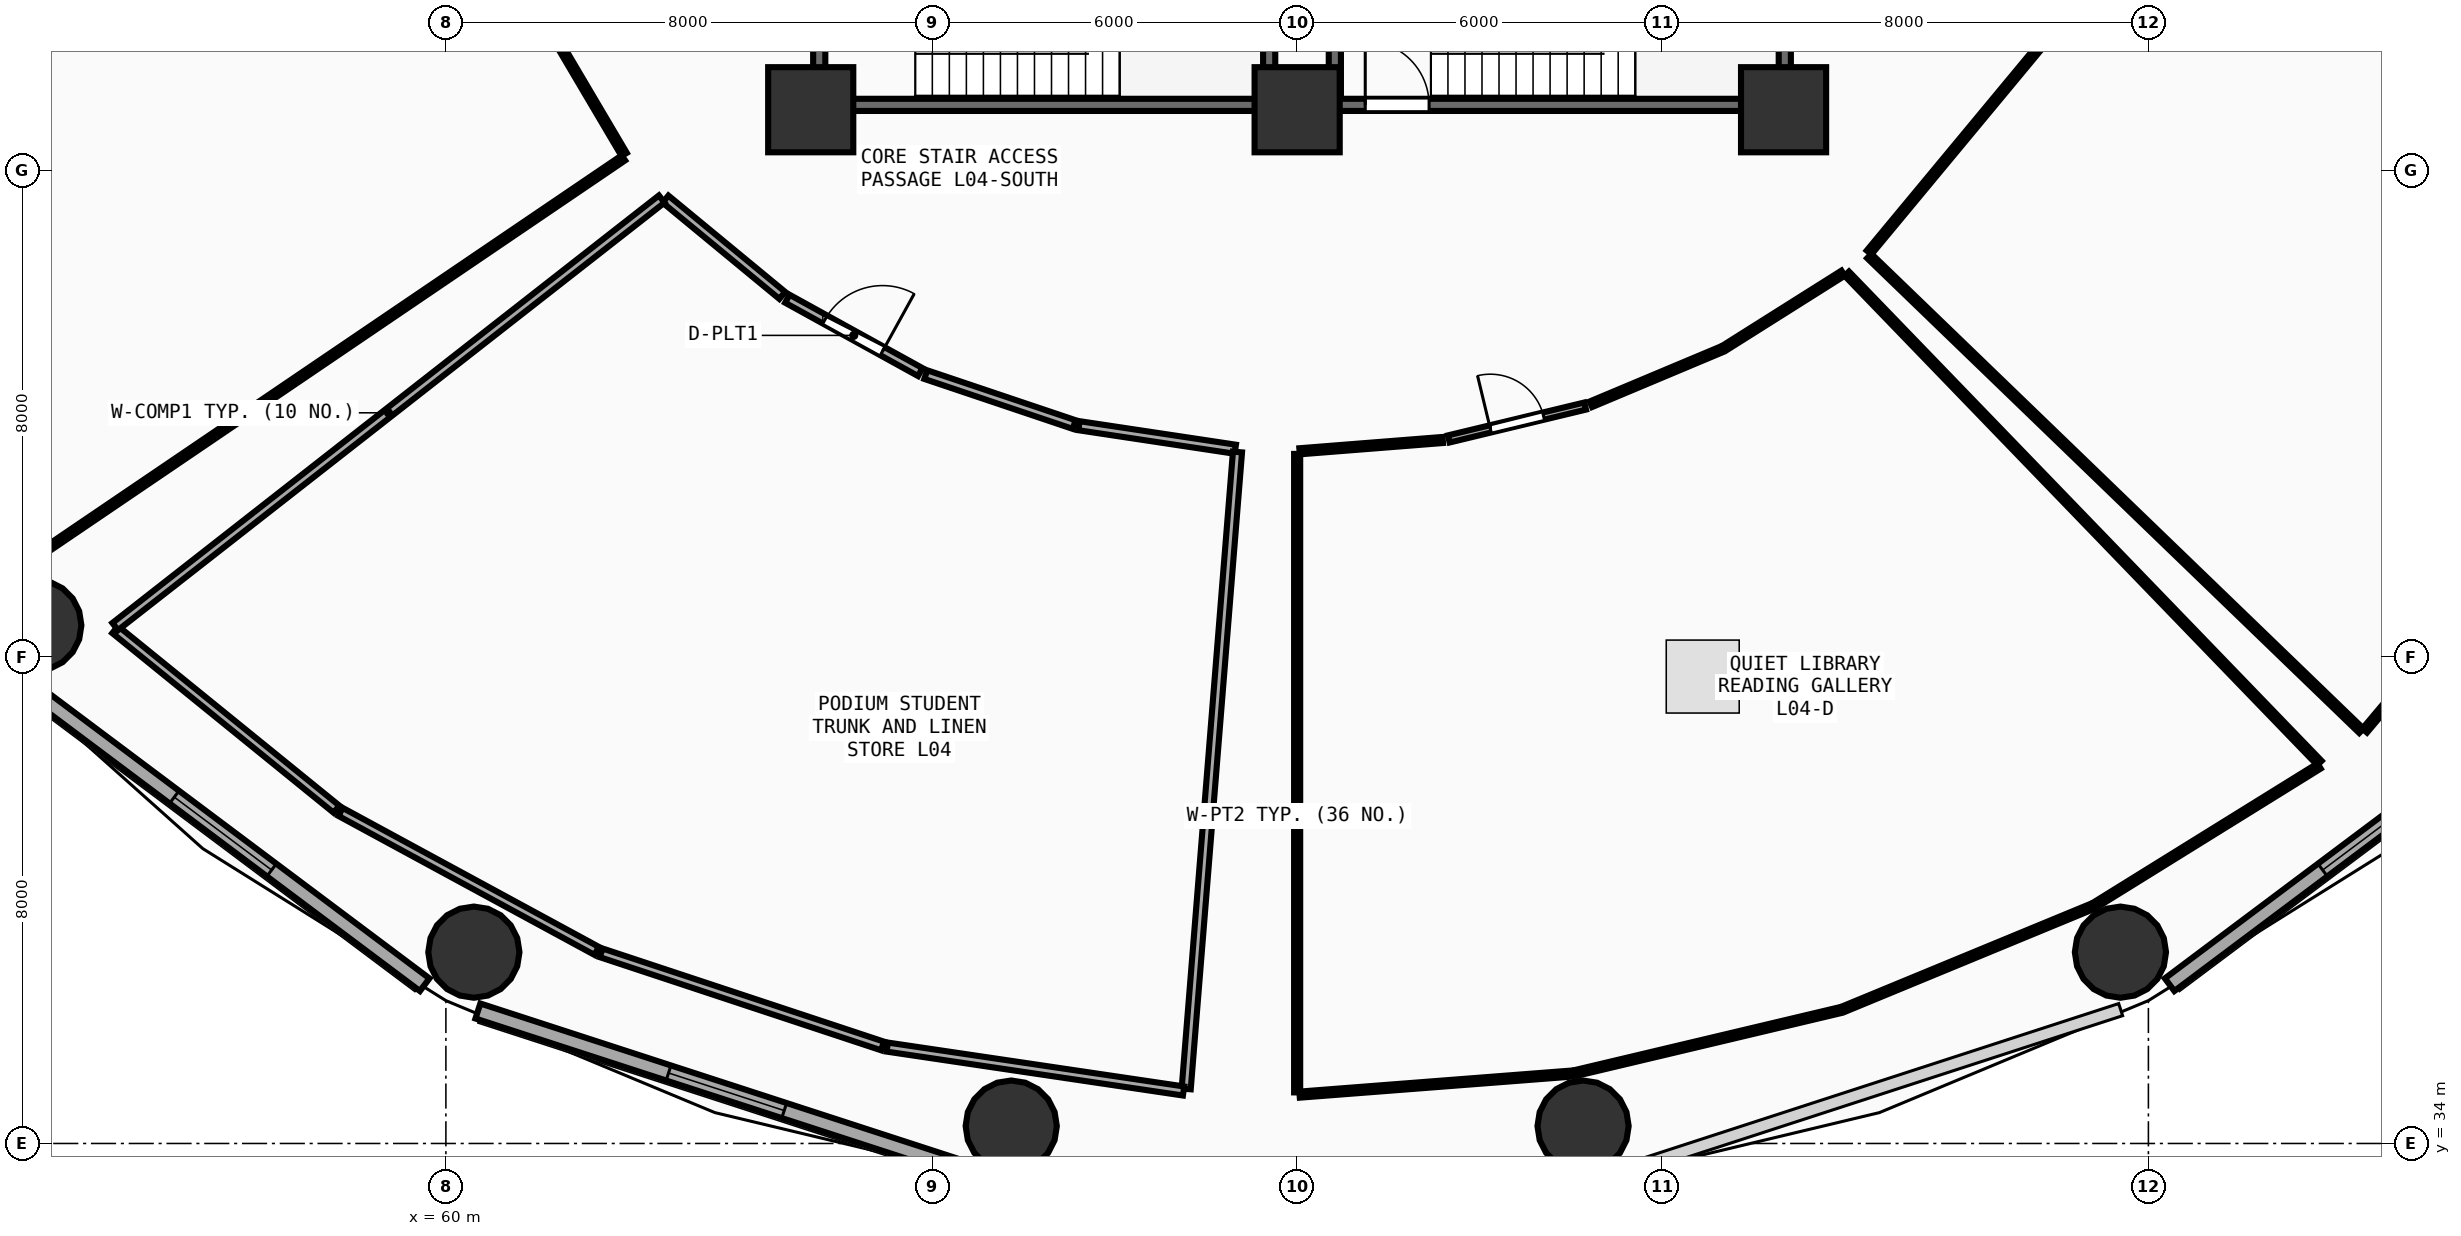
"""IFC4 building model, lengths in metres.
Left out: names, types, materials, properties, quantities, classifications, styles, units other than length and angle.
Written with IfcOpenShell. Run it as: python <this file> out.ifc"""

import sys

from ifc_helpers import new_model, si_unit, direction, frame, frame_2d, origin, origin_2d, place, context, subcontext, project, spatial, rectangle, circle, extrude, element, fill, save


model = new_model("IFC4")
c1 = context("Model", 3, precision=1e-05, world=origin(), true_north=direction((0.0, 1.0)))
c2 = subcontext(c1, "Body", "Model", "MODEL_VIEW")
j1 = project(units=[si_unit("LENGTHUNIT", "METRE"), si_unit("PLANEANGLEUNIT", "RADIAN")], contexts=[c1])
p1 = place(None, origin())
s1 = spatial("IfcSite", under=j1, at=p1, CompositionType="ELEMENT")
p2 = place(p1, origin())
s2 = spatial("IfcBuilding", under=s1, at=p2, CompositionType="ELEMENT")
p3 = place(p2, frame((0.0, 0.0, 18.0)))
s3 = spatial("IfcBuildingStorey", under=s2, at=p3, CompositionType="ELEMENT", Elevation=18.0)
for number, where, z_axis, x_axis in (
    (1, (66.0, 51.0, 0.0), (0.0, 0.0, 1.0), (1.0, 0.0, 0.0)),
    (2, (74.0, 51.0, 0.0), (0.0, 0.0, 1.0), (1.0, 0.0, 0.0)),
    (3, (82.0, 51.0, 0.0), (0.0, 0.0, 1.0), (1.0, 0.0, 0.0)),
):
    element("IfcColumn", number, at=place(p3, frame(where, z_axis=z_axis, x_axis=x_axis)), inside=s3, PredefinedType="PILASTER", context=c2, shape_type="SweptSolid", body=[
        extrude(rectangle(XDim=1.4, YDim=1.4, at=origin_2d()), origin(), (0.0, 0.0, 1.0), 4.5),
    ])
for number, where, z_axis, x_axis in (
    (4, (53.256, 42.522, 0.0), (0.0, 0.0, 1.0), (1.0, 0.0, 0.0)),
    (5, (60.46, 37.146, 0.0), (0.0, 0.0, 1.0), (1.0, 0.0, 0.0)),
    (6, (69.298, 34.286, 0.0), (0.0, 0.0, 1.0), (1.0, 0.0, 0.0)),
    (7, (78.702, 34.286, 0.0), (0.0, 0.0, 1.0), (1.0, 0.0, 0.0)),
    (8, (87.54, 37.146, 0.0), (0.0, 0.0, 1.0), (1.0, 0.0, 0.0)),
):
    element("IfcColumn", number, at=place(p3, frame(where, z_axis=z_axis, x_axis=x_axis)), inside=s3, PredefinedType="COLUMN", context=c2, shape_type="SweptSolid", body=[
        extrude(circle(Radius=0.75, at=origin_2d()), origin(), (0.0, 0.0, 1.0), 4.5),
    ])
p4 = place(p3, frame((53.016, 41.582, 0.0), z_axis=(0.0, 0.0, 1.0), x_axis=(0.80030733173, -0.599590005569, 0.0)))
e9 = element("IfcWall", 9, at=p4, inside=s3, PredefinedType="SOLIDWALL", context=c2, shape_type="SweptSolid", body=[
    extrude(rectangle(XDim=8.291, YDim=0.26, at=frame_2d((4.145, 0.0))), origin(), (0.0, 0.0, 1.0), 4.225),
])
p5 = place(p4, frame((3.145, 0.0, 0.85)))
e10 = element("IfcOpeningElement", 10, at=p5, cuts=e9, PredefinedType="OPENING", context=c2, shape_type="SweptSolid", body=[
    extrude(rectangle(XDim=2.0, YDim=1.75, at=frame_2d((1.0, 0.875))), frame((0.0, 0.14, 0.0), z_axis=(0.0, -1.0, 0.0), x_axis=(1.0, 0.0, 0.0)), (0.0, 0.0, 1.0), 0.28),
])
p6 = place(p3, frame((60.526, 36.178, 0.0), z_axis=(0.0, 0.0, 1.0), x_axis=(0.951039914291, -0.309068085421, 0.0)))
e11 = element("IfcWall", 11, at=p6, inside=s3, PredefinedType="SOLIDWALL", context=c2, shape_type="SweptSolid", body=[
    extrude(rectangle(XDim=8.594, YDim=0.26, at=frame_2d((4.297, 0.0))), origin(), (0.0, 0.0, 1.0), 4.225),
])
p7 = place(p6, frame((3.297, 0.0, 0.85)))
e12 = element("IfcOpeningElement", 12, at=p7, cuts=e11, PredefinedType="OPENING", context=c2, shape_type="SweptSolid", body=[
    extrude(rectangle(XDim=2.0, YDim=1.75, at=frame_2d((1.0, 0.875))), frame((0.0, 0.14, 0.0), z_axis=(0.0, -1.0, 0.0), x_axis=(1.0, 0.0, 0.0)), (0.0, 0.0, 1.0), 0.28),
])
p8 = place(p3, frame((88.349, 36.611, 0.0), z_axis=(0.0, 0.0, 1.0), x_axis=(0.80030733173, 0.599590005569, 0.0)))
e13 = element("IfcWall", 13, at=p8, inside=s3, PredefinedType="SOLIDWALL", context=c2, shape_type="SweptSolid", body=[
    extrude(rectangle(XDim=8.291, YDim=0.26, at=frame_2d((4.145, 0.0))), origin(), (0.0, 0.0, 1.0), 4.225),
])
p9 = place(p8, frame((3.145, 0.0, 0.85)))
e14 = element("IfcOpeningElement", 14, at=p9, cuts=e13, PredefinedType="OPENING", context=c2, shape_type="SweptSolid", body=[
    extrude(rectangle(XDim=2.0, YDim=1.75, at=frame_2d((1.0, 0.875))), frame((0.0, 0.14, 0.0), z_axis=(0.0, -1.0, 0.0), x_axis=(1.0, 0.0, 0.0)), (0.0, 0.0, 1.0), 0.28),
])
p10 = place(p3, frame((74.0, 51.08, 0.0), z_axis=(0.0, 0.0, 1.0), x_axis=(1.0, 0.0, 0.0)))
e15 = element("IfcWall", 15, at=p10, inside=s3, PredefinedType="SHEAR", context=c2, shape_type="SweptSolid", body=[
    extrude(rectangle(XDim=7.9, YDim=0.2, at=frame_2d((3.95, 0.0))), origin(), (0.0, 0.0, 1.0), 4.24),
])
p11 = place(p10, frame((1.12, 0.0, 0.0)))
e16 = element("IfcOpeningElement", 16, at=p11, cuts=e15, PredefinedType="OPENING", context=c2, shape_type="SweptSolid", body=[
    extrude(rectangle(XDim=1.05, YDim=2.1, at=frame_2d((0.525, 1.05))), frame((0.0, 0.11, 0.0), z_axis=(0.0, -1.0, 0.0), x_axis=(1.0, 0.0, 0.0)), (0.0, 0.0, 1.0), 0.22),
])
for number, where, z_axis, x_axis in (
    (17, (82.02, 51.2, 0.0), (0.0, 0.0, 1.0), (0.0, 1.0, 0.0)),
    (18, (74.62, 54.27, 0.0), (0.0, 0.0, 1.0), (0.0, -1.0, 0.0)),
):
    element("IfcWall", number, at=place(p3, frame(where, z_axis=z_axis, x_axis=x_axis)), inside=s3, PredefinedType="SHEAR", context=c2, shape_type="SweptSolid", body=[
        extrude(rectangle(XDim=3.07, YDim=0.2, at=frame_2d((1.535, 0.0))), origin(), (0.0, 0.0, 1.0), 4.24),
    ])
p12 = place(p3, frame((66.26, 51.08, 0.0), z_axis=(0.0, 0.0, 1.0), x_axis=(1.0, 0.0, 0.0)))
e19 = element("IfcWall", 19, at=p12, inside=s3, PredefinedType="SHEAR", context=c2, shape_type="SweptSolid", body=[
    extrude(rectangle(XDim=7.16, YDim=0.2, at=frame_2d((3.58, 0.0))), origin(), (0.0, 0.0, 1.0), 4.24),
])
p13 = place(p3, frame((73.54, 51.2, 0.0), z_axis=(0.0, 0.0, 1.0), x_axis=(0.0, 1.0, 0.0)))
e20 = element("IfcWall", 20, at=p13, inside=s3, PredefinedType="SHEAR", context=c2, shape_type="SweptSolid", body=[
    extrude(rectangle(XDim=3.07, YDim=0.2, at=frame_2d((1.535, 0.0))), origin(), (0.0, 0.0, 1.0), 4.24),
])
p14 = place(p3, frame((66.14, 54.27, 0.0), z_axis=(0.0, 0.0, 1.0), x_axis=(0.0, -1.0, 0.0)))
e21 = element("IfcWall", 21, at=p14, inside=s3, PredefinedType="SHEAR", context=c2, shape_type="SweptSolid", body=[
    extrude(rectangle(XDim=3.07, YDim=0.2, at=frame_2d((1.535, 0.0))), origin(), (0.0, 0.0, 1.0), 4.24),
])
p15 = place(p14, frame((1.01, 0.0, 0.0)))
e22 = element("IfcOpeningElement", 22, at=p15, cuts=e21, PredefinedType="OPENING", context=c2, shape_type="SweptSolid", body=[
    extrude(rectangle(XDim=1.05, YDim=2.1, at=frame_2d((0.525, 1.05))), frame((0.0, 0.11, 0.0), z_axis=(0.0, -1.0, 0.0), x_axis=(1.0, 0.0, 0.0)), (0.0, 0.0, 1.0), 0.22),
])
p16 = place(p3, frame((65.615, 47.892, 0.0), z_axis=(0.0, 0.0, 1.0), x_axis=(0.875583388941, -0.48306700261, 0.0)))
e23 = element("IfcWall", 23, at=p16, inside=s3, PredefinedType="PARTITIONING", context=c2, shape_type="SweptSolid", body=[
    extrude(rectangle(XDim=2.497, YDim=0.15, at=frame_2d((1.248, 0.0))), origin(), (0.0, 0.0, 1.0), 3.625),
])
p17 = place(p16, frame((0.708, 0.0, 0.0)))
e24 = element("IfcOpeningElement", 24, at=p17, cuts=e23, PredefinedType="OPENING", context=c2, shape_type="SweptSolid", body=[
    extrude(rectangle(XDim=1.08, YDim=2.1, at=frame_2d((0.54, 1.05))), frame((0.0, 0.085, 0.0), z_axis=(0.0, -1.0, 0.0), x_axis=(1.0, 0.0, 0.0)), (0.0, 0.0, 1.0), 0.17),
])
p18 = place(p3, frame((76.493, 45.586, 0.0), z_axis=(0.0, 0.0, 1.0), x_axis=(0.972155386029, 0.23433716183, 0.0)))
e25 = element("IfcWall", 25, at=p18, inside=s3, PredefinedType="PARTITIONING", context=c2, shape_type="SweptSolid", body=[
    extrude(rectangle(XDim=2.308, YDim=0.12, at=frame_2d((1.154, 0.0))), origin(), (0.0, 0.0, 1.0), 4.23),
])
p19 = place(p18, frame((0.704, 0.0, 0.0)))
e26 = element("IfcOpeningElement", 26, at=p19, cuts=e25, PredefinedType="OPENING", context=c2, shape_type="SweptSolid", body=[
    extrude(rectangle(XDim=0.9, YDim=2.08, at=frame_2d((0.45, 1.04))), frame((0.0, 0.07, 0.0), z_axis=(0.0, -1.0, 0.0), x_axis=(1.0, 0.0, 0.0)), (0.0, 0.0, 1.0), 0.14),
])
p20 = place(p3, frame((83.406, 48.653, 0.0), z_axis=(0.0, 0.0, 1.0), x_axis=(0.638526743423, 0.769599634832, 0.0)))
e27 = element("IfcWall", 27, at=p20, inside=s3, PredefinedType="PARTITIONING", context=c2, shape_type="SweptSolid", body=[
    extrude(rectangle(XDim=5.046, YDim=0.1, at=frame_2d((2.523, 0.0))), origin(), (0.0, 0.0, 1.0), 3.625),
])
p21 = place(p3, frame((97.622, 47.981, 0.0), z_axis=(0.0, 0.0, 1.0), x_axis=(-0.64470133806, -0.764434552269, 0.0)))
e28 = element("IfcWall", 28, at=p21, inside=s3, PredefinedType="PARTITIONING", context=c2, shape_type="SweptSolid", body=[
    extrude(rectangle(XDim=9.408, YDim=0.1, at=frame_2d((4.704, 0.0))), origin(), (0.0, 0.0, 1.0), 3.625),
])
p22 = place(p3, frame((91.502, 40.787, 0.0), z_axis=(0.0, 0.0, 1.0), x_axis=(-0.719662166332, 0.694324395618, 0.0)))
e29 = element("IfcWall", 29, at=p22, inside=s3, PredefinedType="PARTITIONING", context=c2, shape_type="SweptSolid", body=[
    extrude(rectangle(XDim=11.245, YDim=0.1, at=frame_2d((5.622, 0.0))), origin(), (0.0, 0.0, 1.0), 3.925),
])
p23 = place(p3, frame((60.686, 54.066, 0.0), z_axis=(0.0, 0.0, 1.0), x_axis=(0.508587711925, -0.861010185351, 0.0)))
e30 = element("IfcWall", 30, at=p23, inside=s3, PredefinedType="PARTITIONING", context=c2, shape_type="SweptSolid", body=[
    extrude(rectangle(XDim=4.415, YDim=0.1, at=frame_2d((2.208, 0.0))), origin(), (0.0, 0.0, 1.0), 3.625),
])
p24 = place(p3, frame((62.919, 50.208, 0.0), z_axis=(0.0, 0.0, 1.0), x_axis=(-0.827473664196, -0.561504528086, 0.0)))
e31 = element("IfcWall", 31, at=p24, inside=s3, PredefinedType="PARTITIONING", context=c2, shape_type="SweptSolid", body=[
    extrude(rectangle(XDim=11.519, YDim=0.1, at=frame_2d((5.76, 0.0))), origin(), (0.0, 0.0, 1.0), 3.925),
])
p25 = place(p3, frame((63.612, 49.531, 0.0), z_axis=(0.0, 0.0, 1.0), x_axis=(0.771403369324, -0.636346479361, 0.0)))
e32 = element("IfcWall", 32, at=p25, inside=s3, PredefinedType="PARTITIONING", context=c2, shape_type="SweptSolid", body=[
    extrude(rectangle(XDim=2.489, YDim=0.15, at=frame_2d((1.245, 0.0))), origin(), (0.0, 0.0, 1.0), 3.625),
])
p26 = place(p3, frame((67.892, 46.644, 0.0), z_axis=(0.0, 0.0, 1.0), x_axis=(0.947769420815, -0.318956305735, 0.0)))
e33 = element("IfcWall", 33, at=p26, inside=s3, PredefinedType="PARTITIONING", context=c2, shape_type="SweptSolid", body=[
    extrude(rectangle(XDim=2.576, YDim=0.15, at=frame_2d((1.288, 0.0))), origin(), (0.0, 0.0, 1.0), 4.23),
])
p27 = place(p3, frame((70.411, 45.804, 0.0), z_axis=(0.0, 0.0, 1.0), x_axis=(0.988868771435, -0.148790298341, 0.0)))
e34 = element("IfcWall", 34, at=p27, inside=s3, PredefinedType="PARTITIONING", context=c2, shape_type="SweptSolid", body=[
    extrude(rectangle(XDim=2.601, YDim=0.15, at=frame_2d((1.3, 0.0))), origin(), (0.0, 0.0, 1.0), 4.23),
])
p28 = place(p3, frame((73.019, 45.371, 0.0), z_axis=(0.0, 0.0, 1.0), x_axis=(-0.080272494624, -0.996772956398, 0.0)))
e35 = element("IfcWall", 35, at=p28, inside=s3, PredefinedType="PARTITIONING", context=c2, shape_type="SweptSolid", body=[
    extrude(rectangle(XDim=10.508, YDim=0.15, at=frame_2d((5.254, 0.0))), origin(), (0.0, 0.0, 1.0), 3.925),
])
p29 = place(p3, frame((72.132, 34.863, 0.0), z_axis=(0.0, 0.0, 1.0), x_axis=(-0.989192551677, 0.146622289256, 0.0)))
e36 = element("IfcWall", 36, at=p29, inside=s3, PredefinedType="PARTITIONING", context=c2, shape_type="SweptSolid", body=[
    extrude(rectangle(XDim=4.927, YDim=0.15, at=frame_2d((2.463, 0.0))), origin(), (0.0, 0.0, 1.0), 3.625),
])
p30 = place(p3, frame((67.181, 35.604, 0.0), z_axis=(0.0, 0.0, 1.0), x_axis=(-0.949337318798, 0.314258898262, 0.0)))
e37 = element("IfcWall", 37, at=p30, inside=s3, PredefinedType="PARTITIONING", context=c2, shape_type="SweptSolid", body=[
    extrude(rectangle(XDim=4.875, YDim=0.15, at=frame_2d((2.438, 0.0))), origin(), (0.0, 0.0, 1.0), 4.23),
])
p31 = place(p3, frame((62.48, 37.167, 0.0), z_axis=(0.0, 0.0, 1.0), x_axis=(-0.878938849886, 0.476934479947, 0.0)))
e38 = element("IfcWall", 38, at=p31, inside=s3, PredefinedType="PARTITIONING", context=c2, shape_type="SweptSolid", body=[
    extrude(rectangle(XDim=4.793, YDim=0.15, at=frame_2d((2.396, 0.0))), origin(), (0.0, 0.0, 1.0), 3.625),
])
p32 = place(p3, frame((58.201, 39.497, 0.0), z_axis=(0.0, 0.0, 1.0), x_axis=(-0.77653602146, 0.630072858783, 0.0)))
e39 = element("IfcWall", 39, at=p32, inside=s3, PredefinedType="PARTITIONING", context=c2, shape_type="SweptSolid", body=[
    extrude(rectangle(XDim=4.687, YDim=0.15, at=frame_2d((2.344, 0.0))), origin(), (0.0, 0.0, 1.0), 4.23),
])
p33 = place(p3, frame((54.562, 42.5, 0.0), z_axis=(0.0, 0.0, 1.0), x_axis=(0.787637262368, 0.616139223657, 0.0)))
e40 = element("IfcWall", 40, at=p33, inside=s3, PredefinedType="PARTITIONING", context=c2, shape_type="SweptSolid", body=[
    extrude(rectangle(XDim=11.411, YDim=0.15, at=frame_2d((5.706, 0.0))), origin(), (0.0, 0.0, 1.0), 3.625),
])
p34 = place(p3, frame((74.04, 45.383, 0.0), z_axis=(0.0, 0.0, 1.0), x_axis=(0.996903054033, 0.078640325917, 0.0)))
e41 = element("IfcWall", 41, at=p34, inside=s3, PredefinedType="PARTITIONING", context=c2, shape_type="SweptSolid", body=[
    extrude(rectangle(XDim=2.363, YDim=0.1, at=frame_2d((1.181, 0.0))), origin(), (0.0, 0.0, 1.0), 4.23),
])
p35 = place(p3, frame((78.832, 46.156, 0.0), z_axis=(0.0, 0.0, 1.0), x_axis=(0.922050399206, 0.387069840369, 0.0)))
e42 = element("IfcWall", 42, at=p35, inside=s3, PredefinedType="PARTITIONING", context=c2, shape_type="SweptSolid", body=[
    extrude(rectangle(XDim=2.322, YDim=0.1, at=frame_2d((1.161, 0.0))), origin(), (0.0, 0.0, 1.0), 4.23),
])
p36 = place(p3, frame((81.044, 47.092, 0.0), z_axis=(0.0, 0.0, 1.0), x_axis=(0.845952823598, 0.533257742791, 0.0)))
e43 = element("IfcWall", 43, at=p36, inside=s3, PredefinedType="PARTITIONING", context=c2, shape_type="SweptSolid", body=[
    extrude(rectangle(XDim=2.287, YDim=0.1, at=frame_2d((1.144, 0.0))), origin(), (0.0, 0.0, 1.0), 3.625),
])
p37 = place(p3, frame((83.04, 48.304, 0.0), z_axis=(0.0, 0.0, 1.0), x_axis=(0.694759604878, -0.719242025628, 0.0)))
e44 = element("IfcWall", 44, at=p37, inside=s3, PredefinedType="PARTITIONING", context=c2, shape_type="SweptSolid", body=[
    extrude(rectangle(XDim=11.189, YDim=0.1, at=frame_2d((5.594, 0.0))), origin(), (0.0, 0.0, 1.0), 3.625),
])
p38 = place(p3, frame((90.807, 40.207, 0.0), z_axis=(0.0, 0.0, 1.0), x_axis=(-0.849859173494, -0.527009853066, 0.0)))
e45 = element("IfcWall", 45, at=p38, inside=s3, PredefinedType="PARTITIONING", context=c2, shape_type="SweptSolid", body=[
    extrude(rectangle(XDim=4.322, YDim=0.1, at=frame_2d((2.161, 0.0))), origin(), (0.0, 0.0, 1.0), 3.625),
])
p39 = place(p3, frame((87.063, 37.893, 0.0), z_axis=(0.0, 0.0, 1.0), x_axis=(-0.924323585576, -0.381609629264, 0.0)))
e46 = element("IfcWall", 46, at=p39, inside=s3, PredefinedType="PARTITIONING", context=c2, shape_type="SweptSolid", body=[
    extrude(rectangle(XDim=4.398, YDim=0.1, at=frame_2d((2.199, 0.0))), origin(), (0.0, 0.0, 1.0), 3.625),
])
p40 = place(p3, frame((82.922, 36.19, 0.0), z_axis=(0.0, 0.0, 1.0), x_axis=(-0.972965966702, -0.230948538944, 0.0)))
e47 = element("IfcWall", 47, at=p40, inside=s3, PredefinedType="PARTITIONING", context=c2, shape_type="SweptSolid", body=[
    extrude(rectangle(XDim=4.454, YDim=0.1, at=frame_2d((2.227, 0.0))), origin(), (0.0, 0.0, 1.0), 3.625),
])
p41 = place(p3, frame((78.51, 35.149, 0.0), z_axis=(0.0, 0.0, 1.0), x_axis=(-0.997018824321, -0.077158693286, 0.0)))
e48 = element("IfcWall", 48, at=p41, inside=s3, PredefinedType="PARTITIONING", context=c2, shape_type="SweptSolid", body=[
    extrude(rectangle(XDim=4.484, YDim=0.1, at=frame_2d((2.242, 0.0))), origin(), (0.0, 0.0, 1.0), 4.23),
])
p42 = place(p3, frame((74.0, 34.84, 0.0), z_axis=(0.0, 0.0, 1.0), x_axis=(0.0, 1.0, 0.0)))
e49 = element("IfcWall", 49, at=p42, inside=s3, PredefinedType="PARTITIONING", context=c2, shape_type="SweptSolid", body=[
    extrude(rectangle(XDim=10.5, YDim=0.1, at=frame_2d((5.25, 0.0))), origin(), (0.0, 0.0, 1.0), 3.925),
])
p43 = place(p5, origin())
e50 = element("IfcWindow", 50, at=p43, inside=s3, PartitioningType="SINGLE_PANEL", PredefinedType="WINDOW", context=c2, shape_type="SweptSolid", body=[
    extrude(rectangle(XDim=2.0, YDim=1.75, at=frame_2d((1.0, 0.875))), frame((0.0, 0.03, 0.0), z_axis=(0.0, -1.0, 0.0), x_axis=(1.0, 0.0, 0.0)), (0.0, 0.0, 1.0), 0.06),
])
fill(e10, e50)
p44 = place(p7, origin())
e51 = element("IfcWindow", 51, at=p44, inside=s3, PartitioningType="SINGLE_PANEL", PredefinedType="WINDOW", context=c2, shape_type="SweptSolid", body=[
    extrude(rectangle(XDim=2.0, YDim=1.75, at=frame_2d((1.0, 0.875))), frame((0.0, 0.03, 0.0), z_axis=(0.0, -1.0, 0.0), x_axis=(1.0, 0.0, 0.0)), (0.0, 0.0, 1.0), 0.06),
])
fill(e12, e51)
p45 = place(p9, origin())
e52 = element("IfcWindow", 52, at=p45, inside=s3, PartitioningType="SINGLE_PANEL", PredefinedType="WINDOW", context=c2, shape_type="SweptSolid", body=[
    extrude(rectangle(XDim=2.0, YDim=1.75, at=frame_2d((1.0, 0.875))), frame((0.0, 0.03, 0.0), z_axis=(0.0, -1.0, 0.0), x_axis=(1.0, 0.0, 0.0)), (0.0, 0.0, 1.0), 0.06),
])
fill(e14, e52)
p46 = place(p11, origin())
e53 = element("IfcDoor", 53, at=p46, inside=s3, OperationType="SINGLE_SWING_LEFT", PredefinedType="DOOR", context=c2, shape_type="SweptSolid", body=[
    extrude(rectangle(XDim=1.05, YDim=2.1, at=frame_2d((0.525, 1.05))), frame((0.0, 0.025, 0.0), z_axis=(0.0, -1.0, 0.0), x_axis=(1.0, 0.0, 0.0)), (0.0, 0.0, 1.0), 0.05),
])
fill(e16, e53)
p47 = place(p17, origin())
e54 = element("IfcDoor", 54, at=p47, inside=s3, OperationType="SINGLE_SWING_RIGHT", PredefinedType="DOOR", context=c2, shape_type="SweptSolid", body=[
    extrude(rectangle(XDim=1.08, YDim=2.1, at=frame_2d((0.54, 1.05))), frame((0.0, 0.025, 0.0), z_axis=(0.0, -1.0, 0.0), x_axis=(1.0, 0.0, 0.0)), (0.0, 0.0, 1.0), 0.05),
])
fill(e24, e54)
p48 = place(p19, origin())
e55 = element("IfcDoor", 55, at=p48, inside=s3, OperationType="SINGLE_SWING_LEFT", PredefinedType="DOOR", context=c2, shape_type="SweptSolid", body=[
    extrude(rectangle(XDim=0.9, YDim=2.08, at=frame_2d((0.45, 1.04))), frame((0.0, 0.025, 0.0), z_axis=(0.0, -1.0, 0.0), x_axis=(1.0, 0.0, 0.0)), (0.0, 0.0, 1.0), 0.05),
])
fill(e26, e55)
save(model, sys.argv[1])
